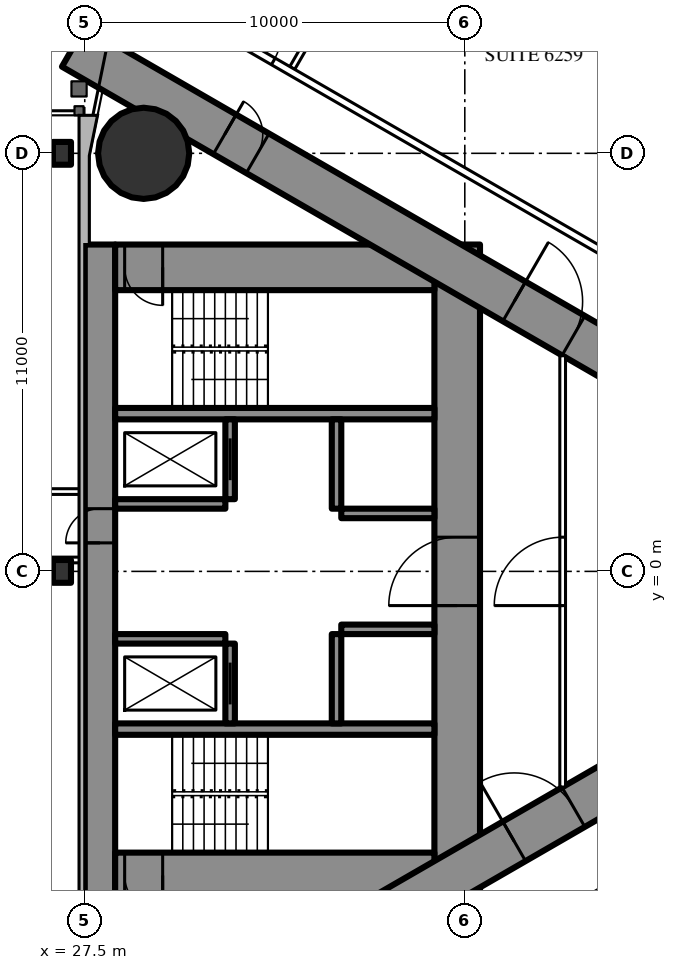
"""IFC4 building model, lengths in metres.
Left out: names, types, materials, properties, quantities, classifications, styles, units other than length and angle.
Written with IfcOpenShell. Run it as: python <this file> out.ifc"""

import sys

from ifc_helpers import new_model, si_unit, direction, frame, frame_2d, origin, origin_2d, place, context, subcontext, project, spatial, rectangle, circle, i_section, extrude, element, fill, save


model = new_model("IFC4")
c1 = context("Model", 3, precision=1e-05, world=origin(), true_north=direction((0.0, 1.0)))
c2 = subcontext(c1, "Body", "Model", "MODEL_VIEW")
j1 = project(units=[si_unit("LENGTHUNIT", "METRE"), si_unit("PLANEANGLEUNIT", "RADIAN")], contexts=[c1])
p1 = place(None, origin())
s1 = spatial("IfcSite", under=j1, at=p1, CompositionType="ELEMENT")
p2 = place(p1, origin())
s2 = spatial("IfcBuilding", under=s1, at=p2, CompositionType="ELEMENT")
p3 = place(p2, frame((0.0, 0.0, 233.3)))
s3 = spatial("IfcBuildingStorey", under=s2, at=p3, CompositionType="ELEMENT", Elevation=233.3)
p4 = place(p3, frame((29.05, 11.0, 0.0), z_axis=(0.0, 0.0, 1.0), x_axis=(1.0, 0.0, 0.0)))
e1 = element("IfcColumn", 1, at=p4, inside=s3, PredefinedType="COLUMN", context=c2, shape_type="SweptSolid", body=[
    extrude(circle(Radius=1.2, at=origin_2d()), origin(), (0.0, 0.0, 1.0), 3.6),
])
p5 = place(p3, frame((27.9, -8.6, 0.0), z_axis=(0.0, 0.0, 1.0), x_axis=(0.0, 1.0, 0.0)))
e2 = element("IfcWall", 2, at=p5, inside=s3, PredefinedType="SHEAR", context=c2, shape_type="SweptSolid", body=[
    extrude(rectangle(XDim=17.2, YDim=0.8, at=frame_2d((8.6, 0.0))), origin(), (0.0, 0.0, 1.0), 3.6),
])
p6 = place(p5, frame((9.35, 0.0, 0.0)))
e3 = element("IfcOpeningElement", 3, at=p6, cuts=e2, PredefinedType="OPENING", context=c2, shape_type="SweptSolid", body=[
    extrude(rectangle(XDim=0.9, YDim=2.2, at=frame_2d((0.45, 1.1))), frame((0.0, 0.41, 0.0), z_axis=(0.0, -1.0, 0.0), x_axis=(1.0, 0.0, 0.0)), (0.0, 0.0, 1.0), 0.82),
])
p7 = place(p3, frame((37.3, -8.6, 0.0), z_axis=(0.0, 0.0, 1.0), x_axis=(0.0, 1.0, 0.0)))
e4 = element("IfcWall", 4, at=p7, inside=s3, PredefinedType="SHEAR", context=c2, shape_type="SweptSolid", body=[
    extrude(rectangle(XDim=17.2, YDim=1.2, at=frame_2d((8.6, 0.0))), origin(), (0.0, 0.0, 1.0), 3.6),
])
p8 = place(p7, frame((7.7, 0.0, 0.0)))
e5 = element("IfcOpeningElement", 5, at=p8, cuts=e4, PredefinedType="OPENING", context=c2, shape_type="SweptSolid", body=[
    extrude(rectangle(XDim=1.8, YDim=2.2, at=frame_2d((0.9, 1.1))), frame((0.0, 0.61, 0.0), z_axis=(0.0, -1.0, 0.0), x_axis=(1.0, 0.0, 0.0)), (0.0, 0.0, 1.0), 1.22),
])
p9 = place(p3, frame((28.3, -8.0, 0.0), z_axis=(0.0, 0.0, 1.0), x_axis=(1.0, 0.0, 0.0)))
e6 = element("IfcWall", 6, at=p9, inside=s3, PredefinedType="SHEAR", context=c2, shape_type="SweptSolid", body=[
    extrude(rectangle(XDim=8.4, YDim=1.2, at=frame_2d((4.2, 0.0))), origin(), (0.0, 0.0, 1.0), 3.6),
])
p10 = place(p9, frame((0.25, 0.0, 0.0)))
e7 = element("IfcOpeningElement", 7, at=p10, cuts=e6, PredefinedType="OPENING", context=c2, shape_type="SweptSolid", body=[
    extrude(rectangle(XDim=1.0, YDim=2.2, at=frame_2d((0.5, 1.1))), frame((0.0, 0.61, 0.0), z_axis=(0.0, -1.0, 0.0), x_axis=(1.0, 0.0, 0.0)), (0.0, 0.0, 1.0), 1.22),
])
p11 = place(p3, frame((28.3, 8.0, 0.0), z_axis=(0.0, 0.0, 1.0), x_axis=(1.0, 0.0, 0.0)))
e8 = element("IfcWall", 8, at=p11, inside=s3, PredefinedType="SHEAR", context=c2, shape_type="SweptSolid", body=[
    extrude(rectangle(XDim=8.4, YDim=1.2, at=frame_2d((4.2, 0.0))), origin(), (0.0, 0.0, 1.0), 3.6),
])
p12 = place(p11, frame((0.25, 0.0, 0.0)))
e9 = element("IfcOpeningElement", 9, at=p12, cuts=e8, PredefinedType="OPENING", context=c2, shape_type="SweptSolid", body=[
    extrude(rectangle(XDim=1.0, YDim=2.2, at=frame_2d((0.5, 1.1))), frame((0.0, 0.61, 0.0), z_axis=(0.0, -1.0, 0.0), x_axis=(1.0, 0.0, 0.0)), (0.0, 0.0, 1.0), 1.22),
])
for number, where, z_axis, x_axis in (
    (10, (28.3, -4.15, 0.0), (0.0, 0.0, 1.0), (1.0, 0.0, 0.0)),
    (11, (28.3, 4.15, 0.0), (0.0, 0.0, 1.0), (1.0, 0.0, 0.0)),
):
    element("IfcWall", number, at=place(p3, frame(where, z_axis=z_axis, x_axis=x_axis)), inside=s3, PredefinedType="SHEAR", context=c2, shape_type="SweptSolid", body=[
        extrude(rectangle(XDim=8.4, YDim=0.3, at=frame_2d((4.2, 0.0))), origin(), (0.0, 0.0, 1.0), 3.6),
    ])
p13 = place(p3, frame((31.325, -4.0, 0.0), z_axis=(0.0, 0.0, 1.0), x_axis=(0.0, 1.0, 0.0)))
e12 = element("IfcWall", 12, at=p13, inside=s3, PredefinedType="SHEAR", context=c2, shape_type="SweptSolid", body=[
    extrude(rectangle(XDim=2.1, YDim=0.25, at=frame_2d((1.05, 0.0))), origin(), (0.0, 0.0, 1.0), 3.6),
])
p14 = place(p13, frame((0.5, 0.0, 0.0)))
e13 = element("IfcOpeningElement", 13, at=p14, cuts=e12, PredefinedType="OPENING", context=c2, shape_type="SweptSolid", body=[
    extrude(rectangle(XDim=1.1, YDim=2.2, at=frame_2d((0.55, 1.1))), frame((0.0, 0.135, 0.0), z_axis=(0.0, -1.0, 0.0), x_axis=(1.0, 0.0, 0.0)), (0.0, 0.0, 1.0), 0.27),
])
p15 = place(p3, frame((34.125, -4.0, 0.0), z_axis=(0.0, 0.0, 1.0), x_axis=(0.0, 1.0, 0.0)))
e14 = element("IfcWall", 14, at=p15, inside=s3, PredefinedType="SHEAR", context=c2, shape_type="SweptSolid", body=[
    extrude(rectangle(XDim=2.35, YDim=0.25, at=frame_2d((1.175, 0.0))), origin(), (0.0, 0.0, 1.0), 3.6),
])
p16 = place(p3, frame((28.3, -1.775, 0.0), z_axis=(0.0, 0.0, 1.0), x_axis=(1.0, 0.0, 0.0)))
e15 = element("IfcWall", 15, at=p16, inside=s3, PredefinedType="SHEAR", context=c2, shape_type="SweptSolid", body=[
    extrude(rectangle(XDim=2.9, YDim=0.25, at=frame_2d((1.45, 0.0))), origin(), (0.0, 0.0, 1.0), 3.6),
])
p17 = place(p3, frame((34.25, -1.525, 0.0), z_axis=(0.0, 0.0, 1.0), x_axis=(1.0, 0.0, 0.0)))
e16 = element("IfcWall", 16, at=p17, inside=s3, PredefinedType="SHEAR", context=c2, shape_type="SweptSolid", body=[
    extrude(rectangle(XDim=2.45, YDim=0.25, at=frame_2d((1.225, 0.0))), origin(), (0.0, 0.0, 1.0), 3.6),
])
p18 = place(p3, frame((31.325, 1.9, 0.0), z_axis=(0.0, 0.0, 1.0), x_axis=(0.0, 1.0, 0.0)))
e17 = element("IfcWall", 17, at=p18, inside=s3, PredefinedType="SHEAR", context=c2, shape_type="SweptSolid", body=[
    extrude(rectangle(XDim=2.1, YDim=0.25, at=frame_2d((1.05, 0.0))), origin(), (0.0, 0.0, 1.0), 3.6),
])
p19 = place(p18, frame((0.5, 0.0, 0.0)))
e18 = element("IfcOpeningElement", 18, at=p19, cuts=e17, PredefinedType="OPENING", context=c2, shape_type="SweptSolid", body=[
    extrude(rectangle(XDim=1.1, YDim=2.2, at=frame_2d((0.55, 1.1))), frame((0.0, 0.135, 0.0), z_axis=(0.0, -1.0, 0.0), x_axis=(1.0, 0.0, 0.0)), (0.0, 0.0, 1.0), 0.27),
])
p20 = place(p3, frame((34.125, 1.65, 0.0), z_axis=(0.0, 0.0, 1.0), x_axis=(0.0, 1.0, 0.0)))
e19 = element("IfcWall", 19, at=p20, inside=s3, PredefinedType="SHEAR", context=c2, shape_type="SweptSolid", body=[
    extrude(rectangle(XDim=2.35, YDim=0.25, at=frame_2d((1.175, 0.0))), origin(), (0.0, 0.0, 1.0), 3.6),
])
p21 = place(p3, frame((28.3, 1.775, 0.0), z_axis=(0.0, 0.0, 1.0), x_axis=(1.0, 0.0, 0.0)))
e20 = element("IfcWall", 20, at=p21, inside=s3, PredefinedType="SHEAR", context=c2, shape_type="SweptSolid", body=[
    extrude(rectangle(XDim=2.9, YDim=0.25, at=frame_2d((1.45, 0.0))), origin(), (0.0, 0.0, 1.0), 3.6),
])
p22 = place(p3, frame((34.25, 1.525, 0.0), z_axis=(0.0, 0.0, 1.0), x_axis=(1.0, 0.0, 0.0)))
e21 = element("IfcWall", 21, at=p22, inside=s3, PredefinedType="SHEAR", context=c2, shape_type="SweptSolid", body=[
    extrude(rectangle(XDim=2.45, YDim=0.25, at=frame_2d((1.225, 0.0))), origin(), (0.0, 0.0, 1.0), 3.6),
])
p23 = place(p3, frame((27.2, -13.8, 0.0), z_axis=(0.0, 0.0, 1.0), x_axis=(0.866027159892, 0.499996958321, 0.0)))
e22 = element("IfcWall", 22, at=p23, inside=s3, PredefinedType="SHEAR", context=c2, shape_type="SweptSolid", body=[
    extrude(rectangle(XDim=27.947, YDim=1.2, at=frame_2d((13.973, 0.0))), origin(), (0.0, 0.0, 1.0), 3.6),
])
p24 = place(p23, frame((4.6, 0.0, 0.0)))
e23 = element("IfcOpeningElement", 23, at=p24, cuts=e22, PredefinedType="OPENING", context=c2, shape_type="SweptSolid", body=[
    extrude(rectangle(XDim=1.0, YDim=2.2, at=frame_2d((0.5, 1.1))), frame((0.0, 0.61, 0.0), z_axis=(0.0, -1.0, 0.0), x_axis=(1.0, 0.0, 0.0)), (0.0, 0.0, 1.0), 1.22),
])
p25 = place(p23, frame((13.395, 0.0, 0.0)))
e24 = element("IfcOpeningElement", 24, at=p25, cuts=e22, PredefinedType="OPENING", context=c2, shape_type="SweptSolid", body=[
    extrude(rectangle(XDim=1.8, YDim=2.2, at=frame_2d((0.9, 1.1))), frame((0.0, 0.61, 0.0), z_axis=(0.0, -1.0, 0.0), x_axis=(1.0, 0.0, 0.0)), (0.0, 0.0, 1.0), 1.22),
])
p26 = place(p3, frame((27.2, 13.8, 0.0), z_axis=(0.0, 0.0, 1.0), x_axis=(0.866024515034, -0.500001539357, 0.0)))
e25 = element("IfcWall", 25, at=p26, inside=s3, PredefinedType="SHEAR", context=c2, shape_type="SweptSolid", body=[
    extrude(rectangle(XDim=26.907, YDim=1.2, at=frame_2d((13.454, 0.0))), origin(), (0.0, 0.0, 1.0), 3.6),
])
p27 = place(p26, frame((4.6, 0.0, 0.0)))
e26 = element("IfcOpeningElement", 26, at=p27, cuts=e25, PredefinedType="OPENING", context=c2, shape_type="SweptSolid", body=[
    extrude(rectangle(XDim=1.0, YDim=2.2, at=frame_2d((0.5, 1.1))), frame((0.0, 0.61, 0.0), z_axis=(0.0, -1.0, 0.0), x_axis=(1.0, 0.0, 0.0)), (0.0, 0.0, 1.0), 1.22),
])
p28 = place(p26, frame((13.395, 0.0, 0.0)))
e27 = element("IfcOpeningElement", 27, at=p28, cuts=e25, PredefinedType="OPENING", context=c2, shape_type="SweptSolid", body=[
    extrude(rectangle(XDim=1.8, YDim=2.2, at=frame_2d((0.9, 1.1))), frame((0.0, 0.61, 0.0), z_axis=(0.0, -1.0, 0.0), x_axis=(1.0, 0.0, 0.0)), (0.0, 0.0, 1.0), 1.22),
])
for number, where, z_axis, x_axis in (
    (28, (26.9, 0.0, 0.0), (0.0, 0.0, 1.0), (1.0, 0.0, 0.0)),
    (29, (26.9, 11.0, 0.0), (0.0, 0.0, 1.0), (1.0, 0.0, 0.0)),
):
    element("IfcColumn", number, at=place(p3, frame(where, z_axis=z_axis, x_axis=x_axis)), inside=s3, PredefinedType="COLUMN", context=c2, shape_type="SweptSolid", body=[
        extrude(i_section(OverallWidth=0.476, OverallDepth=0.6, WebThickness=0.1, FlangeThickness=0.14, FilletRadius=0.02, at=origin_2d()), origin(), (0.0, 0.0, 1.0), 3.6),
    ])
p29 = place(p3, frame((32.96, 13.246, 0.0), z_axis=(0.0, 0.0, 1.0), x_axis=(0.500000236886, 0.866025267018, 0.0)))
e30 = element("IfcWall", 30, at=p29, inside=s3, PredefinedType="PARTITIONING", context=c2, shape_type="SweptSolid", body=[
    extrude(rectangle(XDim=7.583, YDim=0.15, at=frame_2d((3.791, 0.0))), origin(), (0.0, 0.0, 1.0), 3.35),
])
p30 = place(p3, frame((28.959, 15.44, 0.0), z_axis=(0.0, 0.0, 1.0), x_axis=(0.866028936079, -0.499993881836, 0.0)))
e31 = element("IfcWall", 31, at=p30, inside=s3, PredefinedType="PARTITIONING", context=c2, shape_type="SweptSolid", body=[
    extrude(rectangle(XDim=20.503, YDim=0.2, at=frame_2d((10.251, 0.0))), origin(), (0.0, 0.0, 1.0), 3.35),
])
p31 = place(p30, frame((16.137, 0.0, 0.0)))
e32 = element("IfcOpeningElement", 32, at=p31, cuts=e31, PredefinedType="OPENING", context=c2, shape_type="SweptSolid", body=[
    extrude(rectangle(XDim=0.95, YDim=2.2, at=frame_2d((0.475, 1.1))), frame((0.0, 0.11, 0.0), z_axis=(0.0, -1.0, 0.0), x_axis=(1.0, 0.0, 0.0)), (0.0, 0.0, 1.0), 0.22),
])
p32 = place(p30, frame((14.437, 0.0, 0.0)))
e33 = element("IfcOpeningElement", 33, at=p32, cuts=e31, PredefinedType="OPENING", context=c2, shape_type="SweptSolid", body=[
    extrude(rectangle(XDim=0.95, YDim=2.2, at=frame_2d((0.475, 1.1))), frame((0.0, 0.11, 0.0), z_axis=(0.0, -1.0, 0.0), x_axis=(1.0, 0.0, 0.0)), (0.0, 0.0, 1.0), 0.22),
])
p33 = place(p30, frame((2.244, 0.0, 0.0)))
e34 = element("IfcOpeningElement", 34, at=p33, cuts=e31, PredefinedType="OPENING", context=c2, shape_type="SweptSolid", body=[
    extrude(rectangle(XDim=1.8, YDim=2.03, at=frame_2d((0.9, 1.015))), frame((0.0, 0.11, 0.0), z_axis=(0.0, -1.0, 0.0), x_axis=(1.0, 0.0, 0.0)), (0.0, 0.0, 1.0), 0.22),
])
p34 = place(p3, frame((28.959, -15.44, 0.0), z_axis=(0.0, 0.0, 1.0), x_axis=(0.866025204199, 0.500000345692, 0.0)))
e35 = element("IfcWall", 35, at=p34, inside=s3, PredefinedType="PARTITIONING", context=c2, shape_type="SweptSolid", body=[
    extrude(rectangle(XDim=19.646, YDim=0.2, at=frame_2d((9.823, 0.0))), origin(), (0.0, 0.0, 1.0), 3.35),
])
p35 = place(p34, frame((1.494, 0.0, 0.0)))
e36 = element("IfcOpeningElement", 36, at=p35, cuts=e35, PredefinedType="OPENING", context=c2, shape_type="SweptSolid", body=[
    extrude(rectangle(XDim=1.8, YDim=2.03, at=frame_2d((0.9, 1.015))), frame((0.0, 0.11, 0.0), z_axis=(0.0, -1.0, 0.0), x_axis=(1.0, 0.0, 0.0)), (0.0, 0.0, 1.0), 0.22),
])
p36 = place(p34, frame((7.687, 0.0, 0.0)))
e37 = element("IfcOpeningElement", 37, at=p36, cuts=e35, PredefinedType="OPENING", context=c2, shape_type="SweptSolid", body=[
    extrude(rectangle(XDim=1.0, YDim=2.2, at=frame_2d((0.5, 1.1))), frame((0.0, 0.11, 0.0), z_axis=(0.0, -1.0, 0.0), x_axis=(1.0, 0.0, 0.0)), (0.0, 0.0, 1.0), 0.22),
])
p37 = place(p34, frame((18.321, 0.0, 0.0)))
e38 = element("IfcOpeningElement", 38, at=p37, cuts=e35, PredefinedType="OPENING", context=c2, shape_type="SweptSolid", body=[
    extrude(rectangle(XDim=0.95, YDim=2.2, at=frame_2d((0.475, 1.1))), frame((0.0, 0.11, 0.0), z_axis=(0.0, -1.0, 0.0), x_axis=(1.0, 0.0, 0.0)), (0.0, 0.0, 1.0), 0.22),
])
p38 = place(p3, frame((40.075, -5.674, 0.0), z_axis=(0.0, 0.0, 1.0), x_axis=(0.0, 1.0, 0.0)))
e39 = element("IfcWall", 39, at=p38, inside=s3, PredefinedType="PARTITIONING", context=c2, shape_type="SweptSolid", body=[
    extrude(rectangle(XDim=11.348, YDim=0.15, at=frame_2d((5.674, 0.0))), origin(), (0.0, 0.0, 1.0), 3.35),
])
p39 = place(p38, frame((4.774, 0.0, 0.0)))
e40 = element("IfcOpeningElement", 40, at=p39, cuts=e39, PredefinedType="OPENING", context=c2, shape_type="SweptSolid", body=[
    extrude(rectangle(XDim=1.8, YDim=2.2, at=frame_2d((0.9, 1.1))), frame((0.0, 0.085, 0.0), z_axis=(0.0, -1.0, 0.0), x_axis=(1.0, 0.0, 0.0)), (0.0, 0.0, 1.0), 0.17),
])
p40 = place(p3, frame((-27.5, 0.3, 0.0), z_axis=(0.0, 0.0, 1.0), x_axis=(1.0, 0.0, 0.0)))
e41 = element("IfcWall", 41, at=p40, inside=s3, PredefinedType="PARTITIONING", context=c2, shape_type="SweptSolid", body=[
    extrude(rectangle(XDim=55.0, YDim=0.15, at=frame_2d((27.5, 0.0))), origin(), (0.0, 0.0, 1.0), 2.4),
])
p41 = place(p40, frame((1.575, 0.0, 0.0)))
e42 = element("IfcOpeningElement", 42, at=p41, cuts=e41, PredefinedType="OPENING", context=c2, shape_type="SweptSolid", body=[
    extrude(rectangle(XDim=1.0, YDim=2.2, at=frame_2d((0.5, 1.1))), frame((0.0, 0.085, 0.0), z_axis=(0.0, -1.0, 0.0), x_axis=(1.0, 0.0, 0.0)), (0.0, 0.0, 1.0), 0.17),
])
p42 = place(p40, frame((7.525, 0.0, 0.0)))
e43 = element("IfcOpeningElement", 43, at=p42, cuts=e41, PredefinedType="OPENING", context=c2, shape_type="SweptSolid", body=[
    extrude(rectangle(XDim=1.05, YDim=2.4, at=frame_2d((0.525, 1.2))), frame((0.0, 0.085, 0.0), z_axis=(0.0, -1.0, 0.0), x_axis=(1.0, 0.0, 0.0)), (0.0, 0.0, 1.0), 0.17),
])
p43 = place(p40, frame((18.525, 0.0, 0.0)))
e44 = element("IfcOpeningElement", 44, at=p43, cuts=e41, PredefinedType="OPENING", context=c2, shape_type="SweptSolid", body=[
    extrude(rectangle(XDim=1.05, YDim=2.4, at=frame_2d((0.525, 1.2))), frame((0.0, 0.085, 0.0), z_axis=(0.0, -1.0, 0.0), x_axis=(1.0, 0.0, 0.0)), (0.0, 0.0, 1.0), 0.17),
])
p44 = place(p40, frame((24.025, 0.0, 0.0)))
e45 = element("IfcOpeningElement", 45, at=p44, cuts=e41, PredefinedType="OPENING", context=c2, shape_type="SweptSolid", body=[
    extrude(rectangle(XDim=1.05, YDim=2.4, at=frame_2d((0.525, 1.2))), frame((0.0, 0.085, 0.0), z_axis=(0.0, -1.0, 0.0), x_axis=(1.0, 0.0, 0.0)), (0.0, 0.0, 1.0), 0.17),
])
p45 = place(p40, frame((35.025, 0.0, 0.0)))
e46 = element("IfcOpeningElement", 46, at=p45, cuts=e41, PredefinedType="OPENING", context=c2, shape_type="SweptSolid", body=[
    extrude(rectangle(XDim=1.05, YDim=2.4, at=frame_2d((0.525, 1.2))), frame((0.0, 0.085, 0.0), z_axis=(0.0, -1.0, 0.0), x_axis=(1.0, 0.0, 0.0)), (0.0, 0.0, 1.0), 0.17),
])
p46 = place(p40, frame((40.525, 0.0, 0.0)))
e47 = element("IfcOpeningElement", 47, at=p46, cuts=e41, PredefinedType="OPENING", context=c2, shape_type="SweptSolid", body=[
    extrude(rectangle(XDim=1.05, YDim=2.4, at=frame_2d((0.525, 1.2))), frame((0.0, 0.085, 0.0), z_axis=(0.0, -1.0, 0.0), x_axis=(1.0, 0.0, 0.0)), (0.0, 0.0, 1.0), 0.17),
])
p47 = place(p40, frame((52.525, 0.0, 0.0)))
e48 = element("IfcOpeningElement", 48, at=p47, cuts=e41, PredefinedType="OPENING", context=c2, shape_type="SweptSolid", body=[
    extrude(rectangle(XDim=1.05, YDim=2.4, at=frame_2d((0.525, 1.2))), frame((0.0, 0.085, 0.0), z_axis=(0.0, -1.0, 0.0), x_axis=(1.0, 0.0, 0.0)), (0.0, 0.0, 1.0), 0.17),
])
p48 = place(p3, frame((5.85, 2.1, 0.0), z_axis=(0.0, 0.0, 1.0), x_axis=(1.0, 0.0, 0.0)))
e49 = element("IfcWall", 49, at=p48, inside=s3, PredefinedType="PARTITIONING", context=c2, shape_type="SweptSolid", body=[
    extrude(rectangle(XDim=21.65, YDim=0.15, at=frame_2d((10.825, 0.0))), origin(), (0.0, 0.0, 1.0), 3.4),
])
p49 = place(p48, frame((1.675, 0.0, 0.0)))
e50 = element("IfcOpeningElement", 50, at=p49, cuts=e49, PredefinedType="OPENING", context=c2, shape_type="SweptSolid", body=[
    extrude(rectangle(XDim=1.05, YDim=2.4, at=frame_2d((0.525, 1.2))), frame((0.0, 0.085, 0.0), z_axis=(0.0, -1.0, 0.0), x_axis=(1.0, 0.0, 0.0)), (0.0, 0.0, 1.0), 0.17),
])
p50 = place(p48, frame((7.175, 0.0, 0.0)))
e51 = element("IfcOpeningElement", 51, at=p50, cuts=e49, PredefinedType="OPENING", context=c2, shape_type="SweptSolid", body=[
    extrude(rectangle(XDim=1.05, YDim=2.4, at=frame_2d((0.525, 1.2))), frame((0.0, 0.085, 0.0), z_axis=(0.0, -1.0, 0.0), x_axis=(1.0, 0.0, 0.0)), (0.0, 0.0, 1.0), 0.17),
])
p51 = place(p48, frame((19.175, 0.0, 0.0)))
e52 = element("IfcOpeningElement", 52, at=p51, cuts=e49, PredefinedType="OPENING", context=c2, shape_type="SweptSolid", body=[
    extrude(rectangle(XDim=1.05, YDim=2.4, at=frame_2d((0.525, 1.2))), frame((0.0, 0.085, 0.0), z_axis=(0.0, -1.0, 0.0), x_axis=(1.0, 0.0, 0.0)), (0.0, 0.0, 1.0), 0.17),
])
p52 = place(p33, origin())
e53 = element("IfcDoor", 53, at=p52, inside=s3, OperationType="DOUBLE_DOOR_SINGLE_SWING", PredefinedType="DOOR", context=c2, shape_type="SweptSolid", body=[
    extrude(rectangle(XDim=1.8, YDim=2.03, at=frame_2d((0.9, 1.015))), frame((0.0, 0.025, 0.0), z_axis=(0.0, -1.0, 0.0), x_axis=(1.0, 0.0, 0.0)), (0.0, 0.0, 1.0), 0.05),
])
fill(e34, e53)
p53 = place(p39, origin())
e54 = element("IfcDoor", 54, at=p53, inside=s3, OperationType="DOUBLE_DOOR_SINGLE_SWING", PredefinedType="DOOR", context=c2, shape_type="SweptSolid", body=[
    extrude(rectangle(XDim=1.8, YDim=2.2, at=frame_2d((0.9, 1.1))), frame((0.0, 0.025, 0.0), z_axis=(0.0, -1.0, 0.0), x_axis=(1.0, 0.0, 0.0)), (0.0, 0.0, 1.0), 0.05),
])
fill(e40, e54)
p54 = place(p25, origin())
e55 = element("IfcDoor", 55, at=p54, inside=s3, OperationType="DOUBLE_DOOR_SINGLE_SWING", PredefinedType="DOOR", context=c2, shape_type="SweptSolid", body=[
    extrude(rectangle(XDim=1.8, YDim=2.2, at=frame_2d((0.9, 1.1))), frame((0.0, 0.025, 0.0), z_axis=(0.0, -1.0, 0.0), x_axis=(1.0, 0.0, 0.0)), (0.0, 0.0, 1.0), 0.05),
])
fill(e24, e55)
p55 = place(p27, origin())
e56 = element("IfcDoor", 56, at=p55, inside=s3, OperationType="SINGLE_SWING_LEFT", PredefinedType="DOOR", context=c2, shape_type="SweptSolid", body=[
    extrude(rectangle(XDim=1.0, YDim=2.2, at=frame_2d((0.5, 1.1))), frame((0.0, 0.025, 0.0), z_axis=(0.0, -1.0, 0.0), x_axis=(1.0, 0.0, 0.0)), (0.0, 0.0, 1.0), 0.05),
])
fill(e26, e56)
p56 = place(p28, origin())
e57 = element("IfcDoor", 57, at=p56, inside=s3, OperationType="DOUBLE_DOOR_SINGLE_SWING", PredefinedType="DOOR", context=c2, shape_type="SweptSolid", body=[
    extrude(rectangle(XDim=1.8, YDim=2.2, at=frame_2d((0.9, 1.1))), frame((0.0, 0.025, 0.0), z_axis=(0.0, -1.0, 0.0), x_axis=(1.0, 0.0, 0.0)), (0.0, 0.0, 1.0), 0.05),
])
fill(e27, e57)
p57 = place(p8, origin())
e58 = element("IfcDoor", 58, at=p57, inside=s3, OperationType="DOUBLE_DOOR_SINGLE_SWING", PredefinedType="DOOR", context=c2, shape_type="SweptSolid", body=[
    extrude(rectangle(XDim=1.8, YDim=2.2, at=frame_2d((0.9, 1.1))), frame((0.0, 0.025, 0.0), z_axis=(0.0, -1.0, 0.0), x_axis=(1.0, 0.0, 0.0)), (0.0, 0.0, 1.0), 0.05),
])
fill(e5, e58)
p58 = place(p10, origin())
e59 = element("IfcDoor", 59, at=p58, inside=s3, OperationType="SINGLE_SWING_RIGHT", PredefinedType="DOOR", context=c2, shape_type="SweptSolid", body=[
    extrude(rectangle(XDim=1.0, YDim=2.2, at=frame_2d((0.5, 1.1))), frame((0.0, 0.025, 0.0), z_axis=(0.0, -1.0, 0.0), x_axis=(1.0, 0.0, 0.0)), (0.0, 0.0, 1.0), 0.05),
])
fill(e7, e59)
p59 = place(p12, origin())
e60 = element("IfcDoor", 60, at=p59, inside=s3, OperationType="SINGLE_SWING_RIGHT", PredefinedType="DOOR", context=c2, shape_type="SweptSolid", body=[
    extrude(rectangle(XDim=1.0, YDim=2.2, at=frame_2d((0.5, 1.1))), frame((0.0, 0.025, 0.0), z_axis=(0.0, -1.0, 0.0), x_axis=(1.0, 0.0, 0.0)), (0.0, 0.0, 1.0), 0.05),
])
fill(e9, e60)
p60 = place(p6, origin())
e61 = element("IfcDoor", 61, at=p60, inside=s3, OperationType="SINGLE_SWING_LEFT", PredefinedType="DOOR", context=c2, shape_type="SweptSolid", body=[
    extrude(rectangle(XDim=0.9, YDim=2.2, at=frame_2d((0.45, 1.1))), frame((0.0, 0.025, 0.0), z_axis=(0.0, -1.0, 0.0), x_axis=(1.0, 0.0, 0.0)), (0.0, 0.0, 1.0), 0.05),
])
fill(e3, e61)
p61 = place(p14, origin())
e62 = element("IfcDoor", 62, at=p61, inside=s3, OperationType="SLIDING_TO_LEFT", PredefinedType="USERDEFINED", context=c2, shape_type="SweptSolid", body=[
    extrude(rectangle(XDim=1.1, YDim=2.2, at=frame_2d((0.55, 1.1))), frame((0.0, 0.025, 0.0), z_axis=(0.0, -1.0, 0.0), x_axis=(1.0, 0.0, 0.0)), (0.0, 0.0, 1.0), 0.05),
])
fill(e13, e62)
p62 = place(p19, origin())
e63 = element("IfcDoor", 63, at=p62, inside=s3, OperationType="SLIDING_TO_LEFT", PredefinedType="USERDEFINED", context=c2, shape_type="SweptSolid", body=[
    extrude(rectangle(XDim=1.1, YDim=2.2, at=frame_2d((0.55, 1.1))), frame((0.0, 0.025, 0.0), z_axis=(0.0, -1.0, 0.0), x_axis=(1.0, 0.0, 0.0)), (0.0, 0.0, 1.0), 0.05),
])
fill(e18, e63)
save(model, sys.argv[1])
